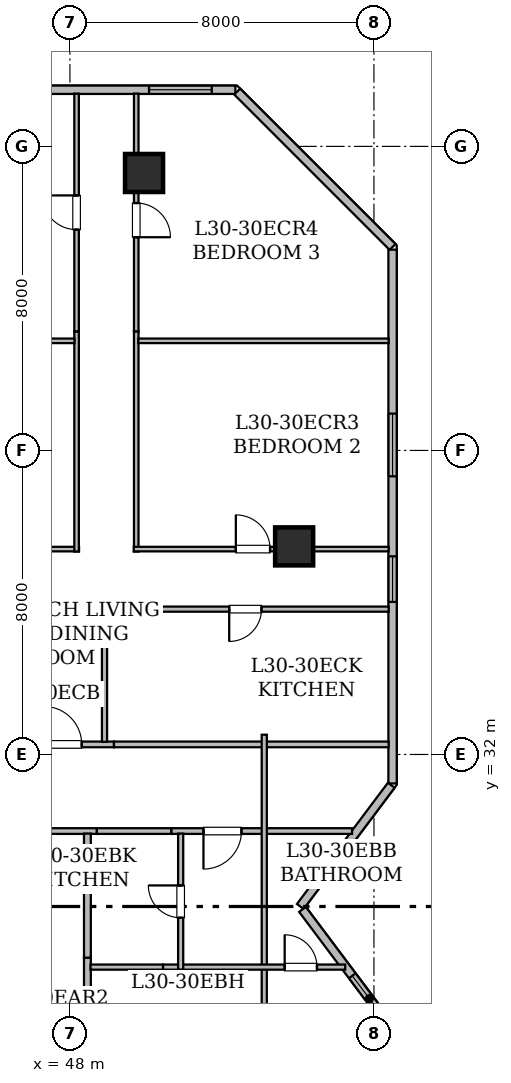
"""IFC4 building model, lengths in metres.
Left out: names, types, materials, properties, quantities, classifications, styles, units other than length and angle.
Written with IfcOpenShell. Run it as: python <this file> out.ifc"""

import sys

from ifc_helpers import new_model, si_unit, direction, frame, frame_2d, origin, origin_2d, place, context, subcontext, project, spatial, rectangle, hollow_rectangle, extrude, element, fill, save


model = new_model("IFC4")
c1 = context("Model", 3, precision=1e-05, world=origin(), true_north=direction((0.0, 1.0)))
c2 = subcontext(c1, "Body", "Model", "MODEL_VIEW")
j1 = project(units=[si_unit("LENGTHUNIT", "METRE"), si_unit("PLANEANGLEUNIT", "RADIAN")], contexts=[c1])
p1 = place(None, origin())
s1 = spatial("IfcSite", under=j1, at=p1, CompositionType="ELEMENT")
p2 = place(p1, origin())
s2 = spatial("IfcBuilding", under=s1, at=p2, CompositionType="ELEMENT")
p3 = place(p2, frame((0.0, 0.0, 120.15)))
s3 = spatial("IfcBuildingStorey", under=s2, at=p3, CompositionType="ELEMENT", Elevation=120.15)
for number, where, z_axis, x_axis in (
    (1, (49.95, 47.3, 0.0), (0.0, 0.0, 1.0), (1.0, 0.0, 0.0)),
    (2, (53.9, 37.475, 0.0), (0.0, 0.0, 1.0), (1.0, 0.0, 0.0)),
):
    element("IfcColumn", number, at=place(p3, frame(where, z_axis=z_axis, x_axis=x_axis)), inside=s3, PredefinedType="COLUMN", context=c2, shape_type="SweptSolid", body=[
        extrude(hollow_rectangle(XDim=1.0, YDim=1.0, WallThickness=0.05, at=origin_2d()), origin(), (0.0, 0.0, 1.0), 3.65),
    ])
p4 = place(p3, frame((13.715, 49.49, 0.0), z_axis=(0.0, 0.0, 1.0), x_axis=(1.0, 0.0, 0.0)))
e3 = element("IfcWall", 3, at=p4, inside=s3, PredefinedType="STANDARD", context=c2, shape_type="SweptSolid", body=[
    extrude(rectangle(XDim=38.639, YDim=0.22, at=frame_2d((19.319, 0.0))), origin(), (0.0, 0.0, 1.0), 3.43),
])
p5 = place(p4, frame((16.16, 0.0, 0.85)))
e4 = element("IfcOpeningElement", 4, at=p5, cuts=e3, PredefinedType="OPENING", context=c2, shape_type="SweptSolid", body=[
    extrude(rectangle(XDim=1.65, YDim=1.55, at=frame_2d((0.825, 0.775))), frame((0.0, 0.12, 0.0), z_axis=(0.0, -1.0, 0.0), x_axis=(1.0, 0.0, 0.0)), (0.0, 0.0, 1.0), 0.24),
])
p6 = place(p4, frame((2.243, 0.0, 0.85)))
e5 = element("IfcOpeningElement", 5, at=p6, cuts=e3, PredefinedType="OPENING", context=c2, shape_type="SweptSolid", body=[
    extrude(rectangle(XDim=1.65, YDim=1.55, at=frame_2d((0.825, 0.775))), frame((0.0, 0.12, 0.0), z_axis=(0.0, -1.0, 0.0), x_axis=(1.0, 0.0, 0.0)), (0.0, 0.0, 1.0), 0.24),
])
p7 = place(p4, frame((11.03, 0.0, 0.85)))
e6 = element("IfcOpeningElement", 6, at=p7, cuts=e3, PredefinedType="OPENING", context=c2, shape_type="SweptSolid", body=[
    extrude(rectangle(XDim=1.65, YDim=1.55, at=frame_2d((0.825, 0.775))), frame((0.0, 0.12, 0.0), z_axis=(0.0, -1.0, 0.0), x_axis=(1.0, 0.0, 0.0)), (0.0, 0.0, 1.0), 0.24),
])
p8 = place(p4, frame((9.2, 0.0, 0.8)))
e7 = element("IfcOpeningElement", 7, at=p8, cuts=e3, PredefinedType="OPENING", context=c2, shape_type="SweptSolid", body=[
    extrude(rectangle(XDim=1.2, YDim=1.5, at=frame_2d((0.6, 0.75))), frame((0.0, 0.12, 0.0), z_axis=(0.0, -1.0, 0.0), x_axis=(1.0, 0.0, 0.0)), (0.0, 0.0, 1.0), 0.24),
])
p9 = place(p4, frame((6.175, 0.0, 0.85)))
e8 = element("IfcOpeningElement", 8, at=p9, cuts=e3, PredefinedType="OPENING", context=c2, shape_type="SweptSolid", body=[
    extrude(rectangle(XDim=1.65, YDim=1.55, at=frame_2d((0.825, 0.775))), frame((0.0, 0.12, 0.0), z_axis=(0.0, -1.0, 0.0), x_axis=(1.0, 0.0, 0.0)), (0.0, 0.0, 1.0), 0.24),
])
p10 = place(p4, frame((23.425, 0.0, 0.85)))
e9 = element("IfcOpeningElement", 9, at=p10, cuts=e3, PredefinedType="OPENING", context=c2, shape_type="SweptSolid", body=[
    extrude(rectangle(XDim=1.65, YDim=1.55, at=frame_2d((0.825, 0.775))), frame((0.0, 0.12, 0.0), z_axis=(0.0, -1.0, 0.0), x_axis=(1.0, 0.0, 0.0)), (0.0, 0.0, 1.0), 0.24),
])
p11 = place(p4, frame((30.23, 0.0, 0.85)))
e10 = element("IfcOpeningElement", 10, at=p11, cuts=e3, PredefinedType="OPENING", context=c2, shape_type="SweptSolid", body=[
    extrude(rectangle(XDim=1.65, YDim=1.55, at=frame_2d((0.825, 0.775))), frame((0.0, 0.12, 0.0), z_axis=(0.0, -1.0, 0.0), x_axis=(1.0, 0.0, 0.0)), (0.0, 0.0, 1.0), 0.24),
])
p12 = place(p4, frame((36.367, 0.0, 0.85)))
e11 = element("IfcOpeningElement", 11, at=p12, cuts=e3, PredefinedType="OPENING", context=c2, shape_type="SweptSolid", body=[
    extrude(rectangle(XDim=1.65, YDim=1.55, at=frame_2d((0.825, 0.775))), frame((0.0, 0.12, 0.0), z_axis=(0.0, -1.0, 0.0), x_axis=(1.0, 0.0, 0.0)), (0.0, 0.0, 1.0), 0.24),
])
p13 = place(p3, frame((52.402, 49.442, 0.0), z_axis=(0.0, 0.0, 1.0), x_axis=(0.707106781187, -0.707106781187, 0.0)))
e12 = element("IfcWall", 12, at=p13, inside=s3, PredefinedType="STANDARD", context=c2, shape_type="SweptSolid", body=[
    extrude(rectangle(XDim=5.781, YDim=0.22, at=frame_2d((2.891, 0.0))), origin(), (0.0, 0.0, 1.0), 3.43),
])
p14 = place(p3, frame((56.49, 45.283, 0.0), z_axis=(0.0, 0.0, 1.0), x_axis=(0.0, -1.0, 0.0)))
e13 = element("IfcWall", 13, at=p14, inside=s3, PredefinedType="STANDARD", context=c2, shape_type="SweptSolid", body=[
    extrude(rectangle(XDim=14.046, YDim=0.22, at=frame_2d((7.023, 0.0))), origin(), (0.0, 0.0, 1.0), 3.43),
])
p15 = place(p14, frame((8.069, 0.0, 0.8)))
e14 = element("IfcOpeningElement", 14, at=p15, cuts=e13, PredefinedType="OPENING", context=c2, shape_type="SweptSolid", body=[
    extrude(rectangle(XDim=1.2, YDim=1.5, at=frame_2d((0.6, 0.75))), frame((0.0, 0.12, 0.0), z_axis=(0.0, -1.0, 0.0), x_axis=(1.0, 0.0, 0.0)), (0.0, 0.0, 1.0), 0.24),
])
p16 = place(p14, frame((4.314, 0.0, 0.85)))
e15 = element("IfcOpeningElement", 15, at=p16, cuts=e13, PredefinedType="OPENING", context=c2, shape_type="SweptSolid", body=[
    extrude(rectangle(XDim=1.65, YDim=1.55, at=frame_2d((0.825, 0.775))), frame((0.0, 0.12, 0.0), z_axis=(0.0, -1.0, 0.0), x_axis=(1.0, 0.0, 0.0)), (0.0, 0.0, 1.0), 0.24),
])
p17 = place(p3, frame((56.456, 31.191, 0.0), z_axis=(0.0, 0.0, 1.0), x_axis=(-0.600137081448, -0.799897170561, 0.0)))
e16 = element("IfcWall", 16, at=p17, inside=s3, PredefinedType="STANDARD", context=c2, shape_type="SweptSolid", body=[
    extrude(rectangle(XDim=3.989, YDim=0.22, at=frame_2d((1.995, 0.0))), origin(), (0.0, 0.0, 1.0), 3.43),
])
p18 = place(p3, frame((54.119, 27.924, 0.0), z_axis=(0.0, 0.0, 1.0), x_axis=(0.600039540588, -0.799970343032, 0.0)))
e17 = element("IfcWall", 17, at=p18, inside=s3, PredefinedType="STANDARD", context=c2, shape_type="SweptSolid", body=[
    extrude(rectangle(XDim=3.952, YDim=0.22, at=frame_2d((1.976, 0.0))), origin(), (0.0, 0.0, 1.0), 3.43),
])
p19 = place(p18, frame((2.184, 0.0, 0.85)))
e18 = element("IfcOpeningElement", 18, at=p19, cuts=e17, PredefinedType="OPENING", context=c2, shape_type="SweptSolid", body=[
    extrude(rectangle(XDim=1.5, YDim=1.6, at=frame_2d((0.75, 0.8))), frame((0.0, 0.12, 0.0), z_axis=(0.0, -1.0, 0.0), x_axis=(1.0, 0.0, 0.0)), (0.0, 0.0, 1.0), 0.24),
])
p20 = place(p3, frame((48.709, 29.985, 0.0), z_axis=(0.0, 0.0, 1.0), x_axis=(-1.0, 0.0, 0.0)))
e19 = element("IfcWall", 19, at=p20, inside=s3, PredefinedType="STANDARD", context=c2, shape_type="SweptSolid", body=[
    extrude(rectangle(XDim=3.906, YDim=0.15, at=frame_2d((1.953, 0.0))), origin(), (0.0, 0.0, 1.0), 2.647),
])
p21 = place(p3, frame((55.424, 29.985, 0.0), z_axis=(0.0, 0.0, 1.0), x_axis=(-1.0, 0.0, 0.0)))
e20 = element("IfcWall", 20, at=p21, inside=s3, PredefinedType="STANDARD", context=c2, shape_type="SweptSolid", body=[
    extrude(rectangle(XDim=4.759, YDim=0.15, at=frame_2d((2.379, 0.0))), origin(), (0.0, 0.0, 1.0), 2.876),
])
p22 = place(p21, frame((2.91, 0.0, 0.0)))
e21 = element("IfcOpeningElement", 21, at=p22, cuts=e20, PredefinedType="OPENING", context=c2, shape_type="SweptSolid", body=[
    extrude(rectangle(XDim=1.0, YDim=2.15, at=frame_2d((0.5, 1.075))), frame((0.0, 0.085, 0.0), z_axis=(0.0, -1.0, 0.0), x_axis=(1.0, 0.0, 0.0)), (0.0, 0.0, 1.0), 0.17),
])
p23 = place(p3, frame((50.665, 29.985, 0.0), z_axis=(0.0, 0.0, 1.0), x_axis=(-1.0, 0.0, 0.0)))
e22 = element("IfcWall", 22, at=p23, inside=s3, PredefinedType="STANDARD", context=c2, shape_type="SweptSolid", body=[
    extrude(rectangle(XDim=1.956, YDim=0.15, at=frame_2d((0.978, 0.0))), origin(), (0.0, 0.0, 1.0), 3.43),
])
p24 = place(p3, frame((46.461, 32.265, 0.0), z_axis=(0.0, 0.0, 1.0), x_axis=(1.0, 0.0, 0.0)))
e23 = element("IfcWall", 23, at=p24, inside=s3, PredefinedType="STANDARD", context=c2, shape_type="SweptSolid", body=[
    extrude(rectangle(XDim=2.698, YDim=0.15, at=frame_2d((1.349, 0.0))), origin(), (0.0, 0.0, 1.0), 2.647),
])
p25 = place(p24, frame((0.849, 0.0, 0.0)))
e24 = element("IfcOpeningElement", 24, at=p25, cuts=e23, PredefinedType="OPENING", context=c2, shape_type="SweptSolid", body=[
    extrude(rectangle(XDim=1.0, YDim=2.15, at=frame_2d((0.5, 1.075))), frame((0.0, 0.085, 0.0), z_axis=(0.0, -1.0, 0.0), x_axis=(1.0, 0.0, 0.0)), (0.0, 0.0, 1.0), 0.17),
])
p26 = place(p3, frame((49.159, 32.265, 0.0), z_axis=(0.0, 0.0, 1.0), x_axis=(1.0, 0.0, 0.0)))
e25 = element("IfcWall", 25, at=p26, inside=s3, PredefinedType="STANDARD", context=c2, shape_type="SweptSolid", body=[
    extrude(rectangle(XDim=7.229, YDim=0.15, at=frame_2d((3.615, 0.0))), origin(), (0.0, 0.0, 1.0), 2.876),
])
p27 = place(p3, frame((48.46, 26.654, 0.0), z_axis=(0.0, 0.0, 1.0), x_axis=(0.0, -1.0, 0.0)))
e26 = element("IfcWall", 26, at=p27, inside=s3, PredefinedType="STANDARD", context=c2, shape_type="SweptSolid", body=[
    extrude(rectangle(XDim=2.078, YDim=0.18, at=frame_2d((1.039, 0.0))), origin(), (0.0, 0.0, 1.0), 3.43),
])
p28 = place(p3, frame((48.46, 29.918, 0.0), z_axis=(0.0, 0.0, 1.0), x_axis=(0.0, -1.0, 0.0)))
e27 = element("IfcWall", 27, at=p28, inside=s3, PredefinedType="STANDARD", context=c2, shape_type="SweptSolid", body=[
    extrude(rectangle(XDim=3.264, YDim=0.18, at=frame_2d((1.632, 0.0))), origin(), (0.0, 0.0, 1.0), 3.43),
])
p29 = place(p3, frame((53.114, 32.52, 0.0), z_axis=(0.0, 0.0, 1.0), x_axis=(0.0, -1.0, 0.0)))
e28 = element("IfcWall", 28, at=p29, inside=s3, PredefinedType="PARTITIONING", context=c2, shape_type="SweptSolid", body=[
    extrude(rectangle(XDim=8.78, YDim=0.135, at=frame_2d((4.39, 0.0))), origin(), (0.0, 0.0, 1.0), 3.43),
])
p30 = place(p3, frame((50.449, 26.405, 0.0), z_axis=(0.0, 0.0, 1.0), x_axis=(1.0, 0.0, 0.0)))
e29 = element("IfcWall", 29, at=p30, inside=s3, PredefinedType="PARTITIONING", context=c2, shape_type="SweptSolid", body=[
    extrude(rectangle(XDim=4.795, YDim=0.135, at=frame_2d((2.397, 0.0))), origin(), (0.0, 0.0, 1.0), 2.876),
])
p31 = place(p30, frame((3.202, 0.0, 0.0)))
e30 = element("IfcOpeningElement", 30, at=p31, cuts=e29, PredefinedType="OPENING", context=c2, shape_type="SweptSolid", body=[
    extrude(rectangle(XDim=0.85, YDim=2.1, at=frame_2d((0.425, 1.05))), frame((0.0, 0.077, 0.0), z_axis=(0.0, -1.0, 0.0), x_axis=(1.0, 0.0, 0.0)), (0.0, 0.0, 1.0), 0.155),
])
p32 = place(p3, frame((48.542, 26.405, 0.0), z_axis=(0.0, 0.0, 1.0), x_axis=(1.0, 0.0, 0.0)))
e31 = element("IfcWall", 31, at=p32, inside=s3, PredefinedType="PARTITIONING", context=c2, shape_type="SweptSolid", body=[
    extrude(rectangle(XDim=1.907, YDim=0.135, at=frame_2d((0.954, 0.0))), origin(), (0.0, 0.0, 1.0), 3.43),
])
p33 = place(p3, frame((50.914, 26.34, 0.0), z_axis=(0.0, 0.0, 1.0), x_axis=(0.0, 1.0, 0.0)))
e32 = element("IfcWall", 32, at=p33, inside=s3, PredefinedType="PARTITIONING", context=c2, shape_type="SweptSolid", body=[
    extrude(rectangle(XDim=3.578, YDim=0.135, at=frame_2d((1.789, 0.0))), origin(), (0.0, 0.0, 1.0), 3.43),
])
p34 = place(p33, frame((1.364, 0.0, 0.0)))
e33 = element("IfcOpeningElement", 33, at=p34, cuts=e32, PredefinedType="OPENING", context=c2, shape_type="SweptSolid", body=[
    extrude(rectangle(XDim=0.85, YDim=2.1, at=frame_2d((0.425, 1.05))), frame((0.0, 0.077, 0.0), z_axis=(0.0, -1.0, 0.0), x_axis=(1.0, 0.0, 0.0)), (0.0, 0.0, 1.0), 0.155),
])
p35 = place(p3, frame((56.388, 35.824, 0.0), z_axis=(0.0, 0.0, 1.0), x_axis=(-1.0, 0.0, 0.0)))
e34 = element("IfcWall", 34, at=p35, inside=s3, PredefinedType="PARTITIONING", context=c2, shape_type="SweptSolid", body=[
    extrude(rectangle(XDim=7.543, YDim=0.135, at=frame_2d((3.771, 0.0))), origin(), (0.0, 0.0, 1.0), 2.876),
])
p36 = place(p35, frame((3.347, 0.0, 0.0)))
e35 = element("IfcOpeningElement", 35, at=p36, cuts=e34, PredefinedType="OPENING", context=c2, shape_type="SweptSolid", body=[
    extrude(rectangle(XDim=0.85, YDim=2.1, at=frame_2d((0.425, 1.05))), frame((0.0, 0.077, 0.0), z_axis=(0.0, -1.0, 0.0), x_axis=(1.0, 0.0, 0.0)), (0.0, 0.0, 1.0), 0.155),
])
p37 = place(p3, frame((48.91, 35.889, 0.0), z_axis=(0.0, 0.0, 1.0), x_axis=(0.0, -1.0, 0.0)))
e36 = element("IfcWall", 36, at=p37, inside=s3, PredefinedType="PARTITIONING", context=c2, shape_type="SweptSolid", body=[
    extrude(rectangle(XDim=3.557, YDim=0.135, at=frame_2d((1.778, 0.0))), origin(), (0.0, 0.0, 1.0), 3.43),
])
p38 = place(p3, frame((41.432, 37.404, 0.0), z_axis=(0.0, 0.0, 1.0), x_axis=(1.0, 0.0, 0.0)))
e37 = element("IfcWall", 37, at=p38, inside=s3, PredefinedType="PARTITIONING", context=c2, shape_type="SweptSolid", body=[
    extrude(rectangle(XDim=6.808, YDim=0.12, at=frame_2d((3.404, 0.0))), origin(), (0.0, 0.0, 1.0), 2.647),
])
p39 = place(p38, frame((2.954, 0.0, 0.0)))
e38 = element("IfcOpeningElement", 38, at=p39, cuts=e37, PredefinedType="OPENING", context=c2, shape_type="SweptSolid", body=[
    extrude(rectangle(XDim=0.9, YDim=2.1, at=frame_2d((0.45, 1.05))), frame((0.0, 0.07, 0.0), z_axis=(0.0, -1.0, 0.0), x_axis=(1.0, 0.0, 0.0)), (0.0, 0.0, 1.0), 0.14),
])
p40 = place(p3, frame((48.175, 37.339, 0.0), z_axis=(0.0, 0.0, 1.0), x_axis=(0.0, 1.0, 0.0)))
e39 = element("IfcWall", 39, at=p40, inside=s3, PredefinedType="PARTITIONING", context=c2, shape_type="SweptSolid", body=[
    extrude(rectangle(XDim=5.794, YDim=0.12, at=frame_2d((2.897, 0.0))), origin(), (0.0, 0.0, 1.0), 2.647),
])
p41 = place(p3, frame((48.175, 43.133, 0.0), z_axis=(0.0, 0.0, 1.0), x_axis=(0.0, 1.0, 0.0)))
e40 = element("IfcWall", 40, at=p41, inside=s3, PredefinedType="PARTITIONING", context=c2, shape_type="SweptSolid", body=[
    extrude(rectangle(XDim=6.255, YDim=0.12, at=frame_2d((3.127, 0.0))), origin(), (0.0, 0.0, 1.0), 2.647),
])
p42 = place(p41, frame((2.677, 0.0, 0.0)))
e41 = element("IfcOpeningElement", 41, at=p42, cuts=e40, PredefinedType="OPENING", context=c2, shape_type="SweptSolid", body=[
    extrude(rectangle(XDim=0.9, YDim=2.1, at=frame_2d((0.45, 1.05))), frame((0.0, 0.07, 0.0), z_axis=(0.0, -1.0, 0.0), x_axis=(1.0, 0.0, 0.0)), (0.0, 0.0, 1.0), 0.14),
])
p43 = place(p3, frame((49.745, 43.133, 0.0), z_axis=(0.0, 0.0, 1.0), x_axis=(0.0, -1.0, 0.0)))
e42 = element("IfcWall", 42, at=p43, inside=s3, PredefinedType="PARTITIONING", context=c2, shape_type="SweptSolid", body=[
    extrude(rectangle(XDim=5.794, YDim=0.12, at=frame_2d((2.897, 0.0))), origin(), (0.0, 0.0, 1.0), 2.647),
])
p44 = place(p3, frame((49.68, 37.404, 0.0), z_axis=(0.0, 0.0, 1.0), x_axis=(1.0, 0.0, 0.0)))
e43 = element("IfcWall", 43, at=p44, inside=s3, PredefinedType="PARTITIONING", context=c2, shape_type="SweptSolid", body=[
    extrude(rectangle(XDim=6.708, YDim=0.12, at=frame_2d((3.354, 0.0))), origin(), (0.0, 0.0, 1.0), 2.647),
])
p45 = place(p44, frame((2.686, 0.0, 0.0)))
e44 = element("IfcOpeningElement", 44, at=p45, cuts=e43, PredefinedType="OPENING", context=c2, shape_type="SweptSolid", body=[
    extrude(rectangle(XDim=0.9, YDim=2.1, at=frame_2d((0.45, 1.05))), frame((0.0, 0.07, 0.0), z_axis=(0.0, -1.0, 0.0), x_axis=(1.0, 0.0, 0.0)), (0.0, 0.0, 1.0), 0.14),
])
p46 = place(p3, frame((49.745, 49.388, 0.0), z_axis=(0.0, 0.0, 1.0), x_axis=(0.0, -1.0, 0.0)))
e45 = element("IfcWall", 45, at=p46, inside=s3, PredefinedType="PARTITIONING", context=c2, shape_type="SweptSolid", body=[
    extrude(rectangle(XDim=6.255, YDim=0.12, at=frame_2d((3.127, 0.0))), origin(), (0.0, 0.0, 1.0), 2.647),
])
p47 = place(p46, frame((2.878, 0.0, 0.0)))
e46 = element("IfcOpeningElement", 46, at=p47, cuts=e45, PredefinedType="OPENING", context=c2, shape_type="SweptSolid", body=[
    extrude(rectangle(XDim=0.9, YDim=2.1, at=frame_2d((0.45, 1.05))), frame((0.0, 0.07, 0.0), z_axis=(0.0, -1.0, 0.0), x_axis=(1.0, 0.0, 0.0)), (0.0, 0.0, 1.0), 0.14),
])
p48 = place(p3, frame((41.447, 42.884, 0.0), z_axis=(0.0, 0.0, 1.0), x_axis=(1.0, 0.0, 0.0)))
e47 = element("IfcWall", 47, at=p48, inside=s3, PredefinedType="PARTITIONING", context=c2, shape_type="SweptSolid", body=[
    extrude(rectangle(XDim=6.674, YDim=0.12, at=frame_2d((3.337, 0.0))), origin(), (0.0, 0.0, 1.0), 3.43),
])
p49 = place(p3, frame((49.799, 42.884, 0.0), z_axis=(0.0, 0.0, 1.0), x_axis=(1.0, 0.0, 0.0)))
e48 = element("IfcWall", 48, at=p49, inside=s3, PredefinedType="PARTITIONING", context=c2, shape_type="SweptSolid", body=[
    extrude(rectangle(XDim=6.589, YDim=0.12, at=frame_2d((3.294, 0.0))), origin(), (0.0, 0.0, 1.0), 2.876),
])
p50 = place(p19, origin())
e49 = element("IfcWindow", 49, at=p50, inside=s3, PartitioningType="SINGLE_PANEL", PredefinedType="WINDOW", context=c2, shape_type="SweptSolid", body=[
    extrude(rectangle(XDim=1.5, YDim=1.6, at=frame_2d((0.75, 0.8))), frame((0.0, 0.03, 0.0), z_axis=(0.0, -1.0, 0.0), x_axis=(1.0, 0.0, 0.0)), (0.0, 0.0, 1.0), 0.06),
])
fill(e18, e49)
p51 = place(p15, origin())
e50 = element("IfcWindow", 50, at=p51, inside=s3, PartitioningType="SINGLE_PANEL", PredefinedType="WINDOW", context=c2, shape_type="SweptSolid", body=[
    extrude(rectangle(XDim=1.2, YDim=1.5, at=frame_2d((0.6, 0.75))), frame((0.0, 0.03, 0.0), z_axis=(0.0, -1.0, 0.0), x_axis=(1.0, 0.0, 0.0)), (0.0, 0.0, 1.0), 0.06),
])
fill(e14, e50)
p52 = place(p16, origin())
e51 = element("IfcWindow", 51, at=p52, inside=s3, PartitioningType="SINGLE_PANEL", PredefinedType="WINDOW", context=c2, shape_type="SweptSolid", body=[
    extrude(rectangle(XDim=1.65, YDim=1.55, at=frame_2d((0.825, 0.775))), frame((0.0, 0.03, 0.0), z_axis=(0.0, -1.0, 0.0), x_axis=(1.0, 0.0, 0.0)), (0.0, 0.0, 1.0), 0.06),
])
fill(e15, e51)
p53 = place(p12, origin())
e52 = element("IfcWindow", 52, at=p53, inside=s3, PartitioningType="SINGLE_PANEL", PredefinedType="WINDOW", context=c2, shape_type="SweptSolid", body=[
    extrude(rectangle(XDim=1.65, YDim=1.55, at=frame_2d((0.825, 0.775))), frame((0.0, 0.03, 0.0), z_axis=(0.0, -1.0, 0.0), x_axis=(1.0, 0.0, 0.0)), (0.0, 0.0, 1.0), 0.06),
])
fill(e11, e52)
p54 = place(p22, origin())
e53 = element("IfcDoor", 53, at=p54, inside=s3, OperationType="SINGLE_SWING_RIGHT", PredefinedType="DOOR", context=c2, shape_type="SweptSolid", body=[
    extrude(rectangle(XDim=1.0, YDim=2.15, at=frame_2d((0.5, 1.075))), frame((0.0, 0.025, 0.0), z_axis=(0.0, -1.0, 0.0), x_axis=(1.0, 0.0, 0.0)), (0.0, 0.0, 1.0), 0.05),
])
fill(e21, e53)
p55 = place(p25, origin())
e54 = element("IfcDoor", 54, at=p55, inside=s3, OperationType="SINGLE_SWING_LEFT", PredefinedType="DOOR", context=c2, shape_type="SweptSolid", body=[
    extrude(rectangle(XDim=1.0, YDim=2.15, at=frame_2d((0.5, 1.075))), frame((0.0, 0.025, 0.0), z_axis=(0.0, -1.0, 0.0), x_axis=(1.0, 0.0, 0.0)), (0.0, 0.0, 1.0), 0.05),
])
fill(e24, e54)
p56 = place(p31, origin())
e55 = element("IfcDoor", 55, at=p56, inside=s3, OperationType="SINGLE_SWING_LEFT", PredefinedType="DOOR", context=c2, shape_type="SweptSolid", body=[
    extrude(rectangle(XDim=0.85, YDim=2.1, at=frame_2d((0.425, 1.05))), frame((0.0, 0.025, 0.0), z_axis=(0.0, -1.0, 0.0), x_axis=(1.0, 0.0, 0.0)), (0.0, 0.0, 1.0), 0.05),
])
fill(e30, e55)
p57 = place(p34, origin())
e56 = element("IfcDoor", 56, at=p57, inside=s3, OperationType="SINGLE_SWING_RIGHT", PredefinedType="DOOR", context=c2, shape_type="SweptSolid", body=[
    extrude(rectangle(XDim=0.85, YDim=2.1, at=frame_2d((0.425, 1.05))), frame((0.0, 0.025, 0.0), z_axis=(0.0, -1.0, 0.0), x_axis=(1.0, 0.0, 0.0)), (0.0, 0.0, 1.0), 0.05),
])
fill(e33, e56)
p58 = place(p36, origin())
e57 = element("IfcDoor", 57, at=p58, inside=s3, OperationType="SINGLE_SWING_RIGHT", PredefinedType="DOOR", context=c2, shape_type="SweptSolid", body=[
    extrude(rectangle(XDim=0.85, YDim=2.1, at=frame_2d((0.425, 1.05))), frame((0.0, 0.025, 0.0), z_axis=(0.0, -1.0, 0.0), x_axis=(1.0, 0.0, 0.0)), (0.0, 0.0, 1.0), 0.05),
])
fill(e35, e57)
p59 = place(p42, origin())
e58 = element("IfcDoor", 58, at=p59, inside=s3, OperationType="SINGLE_SWING_RIGHT", PredefinedType="DOOR", context=c2, shape_type="SweptSolid", body=[
    extrude(rectangle(XDim=0.9, YDim=2.1, at=frame_2d((0.45, 1.05))), frame((0.0, 0.025, 0.0), z_axis=(0.0, -1.0, 0.0), x_axis=(1.0, 0.0, 0.0)), (0.0, 0.0, 1.0), 0.05),
])
fill(e41, e58)
p60 = place(p45, origin())
e59 = element("IfcDoor", 59, at=p60, inside=s3, OperationType="SINGLE_SWING_LEFT", PredefinedType="DOOR", context=c2, shape_type="SweptSolid", body=[
    extrude(rectangle(XDim=0.9, YDim=2.1, at=frame_2d((0.45, 1.05))), frame((0.0, 0.025, 0.0), z_axis=(0.0, -1.0, 0.0), x_axis=(1.0, 0.0, 0.0)), (0.0, 0.0, 1.0), 0.05),
])
fill(e44, e59)
p61 = place(p47, origin())
e60 = element("IfcDoor", 60, at=p61, inside=s3, OperationType="SINGLE_SWING_RIGHT", PredefinedType="DOOR", context=c2, shape_type="SweptSolid", body=[
    extrude(rectangle(XDim=0.9, YDim=2.1, at=frame_2d((0.45, 1.05))), frame((0.0, 0.025, 0.0), z_axis=(0.0, -1.0, 0.0), x_axis=(1.0, 0.0, 0.0)), (0.0, 0.0, 1.0), 0.05),
])
fill(e46, e60)
save(model, sys.argv[1])
